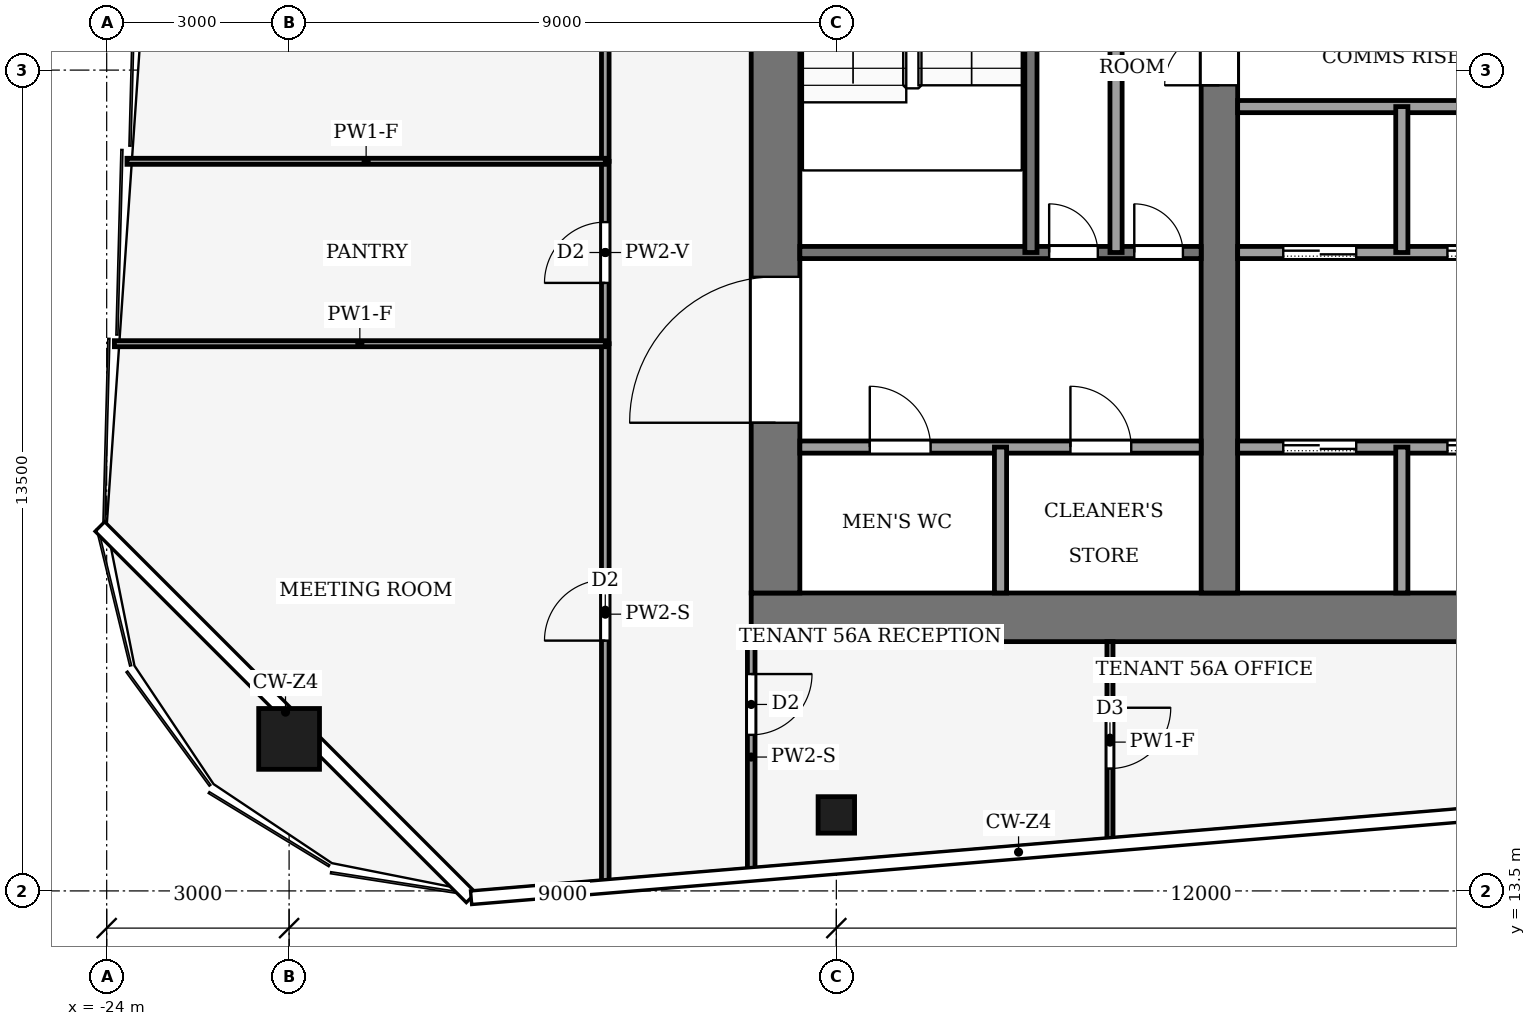
"""IFC4 building model, lengths in metres.
Left out: names, types, materials, properties, quantities, classifications, styles, units other than length and angle.
Written with IfcOpenShell. Run it as: python <this file> out.ifc"""

import sys

from ifc_helpers import new_model, si_unit, direction, frame, frame_2d, origin, origin_2d, place, context, subcontext, project, spatial, rectangle, hollow_rectangle, extrude, element, fill, save


model = new_model("IFC4")
c1 = context("Model", 3, precision=1e-05, world=origin(), true_north=direction((0.0, 1.0)))
c2 = subcontext(c1, "Body", "Model", "MODEL_VIEW")
j1 = project(units=[si_unit("LENGTHUNIT", "METRE"), si_unit("PLANEANGLEUNIT", "RADIAN")], contexts=[c1])
p1 = place(None, origin())
s1 = spatial("IfcSite", under=j1, at=p1, CompositionType="ELEMENT")
p2 = place(p1, origin())
s2 = spatial("IfcBuilding", under=s1, at=p2, CompositionType="ELEMENT")
p3 = place(p2, frame((0.0, 0.0, 246.0)))
s3 = spatial("IfcBuildingStorey", under=s2, at=p3, CompositionType="ELEMENT", Elevation=246.0)
p4 = place(p3, frame((-13.4, 18.0, -0.13), z_axis=(0.0, 0.0, 1.0), x_axis=(1.0, 0.0, 0.0)))
e1 = element("IfcWall", 1, at=p4, inside=s3, PredefinedType="SHEAR", context=c2, shape_type="SweptSolid", body=[
    extrude(rectangle(XDim=26.8, YDim=0.8, at=frame_2d((13.4, 0.0))), origin(), (0.0, 0.0, 1.0), 4.0),
])
p5 = place(p3, frame((-13.0, 18.4, -0.13), z_axis=(0.0, 0.0, 1.0), x_axis=(0.0, 1.0, 0.0)))
e2 = element("IfcWall", 2, at=p5, inside=s3, PredefinedType="SHEAR", context=c2, shape_type="SweptSolid", body=[
    extrude(rectangle(XDim=19.2, YDim=0.8, at=frame_2d((9.6, 0.0))), origin(), (0.0, 0.0, 1.0), 4.0),
])
p6 = place(p5, frame((2.8, 0.0, 0.13)))
e3 = element("IfcOpeningElement", 3, at=p6, cuts=e2, PredefinedType="OPENING", context=c2, shape_type="SweptSolid", body=[
    extrude(rectangle(XDim=2.4, YDim=2.4, at=frame_2d((1.2, 1.2))), frame((0.0, 0.41, 0.0), z_axis=(0.0, -1.0, 0.0), x_axis=(1.0, 0.0, 0.0)), (0.0, 0.0, 1.0), 0.82),
])
p7 = place(p5, frame((13.4, 0.0, 0.13)))
e4 = element("IfcOpeningElement", 4, at=p7, cuts=e2, PredefinedType="OPENING", context=c2, shape_type="SweptSolid", body=[
    extrude(rectangle(XDim=1.4, YDim=2.2, at=frame_2d((0.7, 1.1))), frame((0.0, 0.41, 0.0), z_axis=(0.0, -1.0, 0.0), x_axis=(1.0, 0.0, 0.0)), (0.0, 0.0, 1.0), 0.82),
])
p8 = place(p3, frame((-5.7, 18.4, -0.13), z_axis=(0.0, 0.0, 1.0), x_axis=(0.0, 1.0, 0.0)))
e5 = element("IfcWall", 5, at=p8, inside=s3, PredefinedType="SHEAR", context=c2, shape_type="SweptSolid", body=[
    extrude(rectangle(XDim=19.2, YDim=0.6, at=frame_2d((9.6, 0.0))), origin(), (0.0, 0.0, 1.0), 4.0),
])
p9 = place(p8, frame((8.35, 0.0, 0.13)))
e6 = element("IfcOpeningElement", 6, at=p9, cuts=e5, PredefinedType="OPENING", context=c2, shape_type="SweptSolid", body=[
    extrude(rectangle(XDim=0.9, YDim=2.1, at=frame_2d((0.45, 1.05))), frame((0.0, 0.31, 0.0), z_axis=(0.0, -1.0, 0.0), x_axis=(1.0, 0.0, 0.0)), (0.0, 0.0, 1.0), 0.62),
])
p10 = place(p3, frame((-21.0, 16.0, 0.0), z_axis=(0.0, 0.0, 1.0), x_axis=(1.0, 0.0, 0.0)))
e7 = element("IfcColumn", 7, at=p10, inside=s3, PredefinedType="COLUMN", context=c2, shape_type="SweptSolid", body=[
    extrude(hollow_rectangle(XDim=1.0, YDim=1.0, WallThickness=0.045, at=origin_2d()), origin(), (0.0, 0.0, 1.0), 4.0),
])
p11 = place(p3, frame((-12.0, 14.75, 0.0), z_axis=(0.0, 0.0, 1.0), x_axis=(1.0, 0.0, 0.0)))
e8 = element("IfcColumn", 8, at=p11, inside=s3, PredefinedType="COLUMN", context=c2, shape_type="SweptSolid", body=[
    extrude(hollow_rectangle(XDim=0.6, YDim=0.6, WallThickness=0.025, at=origin_2d()), origin(), (0.0, 0.0, 1.0), 4.0),
])
p12 = place(p3, frame((-12.6, 20.8, 0.0), z_axis=(0.0, 0.0, 1.0), x_axis=(1.0, 0.0, 0.0)))
e9 = element("IfcWall", 9, at=p12, inside=s3, PredefinedType="PARTITIONING", context=c2, shape_type="SweptSolid", body=[
    extrude(rectangle(XDim=6.6, YDim=0.2, at=frame_2d((3.3, 0.0))), origin(), (0.0, 0.0, 1.0), 3.87),
])
p13 = place(p12, frame((1.15, 0.0, 0.0)))
e10 = element("IfcOpeningElement", 10, at=p13, cuts=e9, PredefinedType="OPENING", context=c2, shape_type="SweptSolid", body=[
    extrude(rectangle(XDim=1.0, YDim=2.1, at=frame_2d((0.5, 1.05))), frame((0.0, 0.11, 0.0), z_axis=(0.0, -1.0, 0.0), x_axis=(1.0, 0.0, 0.0)), (0.0, 0.0, 1.0), 0.22),
])
p14 = place(p12, frame((4.45, 0.0, 0.0)))
e11 = element("IfcOpeningElement", 11, at=p14, cuts=e9, PredefinedType="OPENING", context=c2, shape_type="SweptSolid", body=[
    extrude(rectangle(XDim=1.0, YDim=2.1, at=frame_2d((0.5, 1.05))), frame((0.0, 0.11, 0.0), z_axis=(0.0, -1.0, 0.0), x_axis=(1.0, 0.0, 0.0)), (0.0, 0.0, 1.0), 0.22),
])
p15 = place(p3, frame((-5.4, 20.8, 0.0), z_axis=(0.0, 0.0, 1.0), x_axis=(1.0, 0.0, 0.0)))
e12 = element("IfcWall", 12, at=p15, inside=s3, PredefinedType="PARTITIONING", context=c2, shape_type="SweptSolid", body=[
    extrude(rectangle(XDim=10.8, YDim=0.2, at=frame_2d((5.4, 0.0))), origin(), (0.0, 0.0, 1.0), 3.87),
])
p16 = place(p15, frame((0.75, 0.0, 0.0)))
e13 = element("IfcOpeningElement", 13, at=p16, cuts=e12, PredefinedType="OPENING", context=c2, shape_type="SweptSolid", body=[
    extrude(rectangle(XDim=1.2, YDim=2.2, at=frame_2d((0.6, 1.1))), frame((0.0, 0.11, 0.0), z_axis=(0.0, -1.0, 0.0), x_axis=(1.0, 0.0, 0.0)), (0.0, 0.0, 1.0), 0.22),
])
p17 = place(p15, frame((3.45, 0.0, 0.0)))
e14 = element("IfcOpeningElement", 14, at=p17, cuts=e12, PredefinedType="OPENING", context=c2, shape_type="SweptSolid", body=[
    extrude(rectangle(XDim=1.2, YDim=2.2, at=frame_2d((0.6, 1.1))), frame((0.0, 0.11, 0.0), z_axis=(0.0, -1.0, 0.0), x_axis=(1.0, 0.0, 0.0)), (0.0, 0.0, 1.0), 0.22),
])
p18 = place(p15, frame((6.15, 0.0, 0.0)))
e15 = element("IfcOpeningElement", 15, at=p18, cuts=e12, PredefinedType="OPENING", context=c2, shape_type="SweptSolid", body=[
    extrude(rectangle(XDim=1.2, YDim=2.2, at=frame_2d((0.6, 1.1))), frame((0.0, 0.11, 0.0), z_axis=(0.0, -1.0, 0.0), x_axis=(1.0, 0.0, 0.0)), (0.0, 0.0, 1.0), 0.22),
])
p19 = place(p15, frame((8.85, 0.0, 0.0)))
e16 = element("IfcOpeningElement", 16, at=p19, cuts=e12, PredefinedType="OPENING", context=c2, shape_type="SweptSolid", body=[
    extrude(rectangle(XDim=1.2, YDim=2.2, at=frame_2d((0.6, 1.1))), frame((0.0, 0.11, 0.0), z_axis=(0.0, -1.0, 0.0), x_axis=(1.0, 0.0, 0.0)), (0.0, 0.0, 1.0), 0.22),
])
p20 = place(p3, frame((-12.6, 24.0, 0.0), z_axis=(0.0, 0.0, 1.0), x_axis=(1.0, 0.0, 0.0)))
e17 = element("IfcWall", 17, at=p20, inside=s3, PredefinedType="PARTITIONING", context=c2, shape_type="SweptSolid", body=[
    extrude(rectangle(XDim=6.6, YDim=0.2, at=frame_2d((3.3, 0.0))), origin(), (0.0, 0.0, 1.0), 3.87),
])
p21 = place(p20, frame((4.1, 0.0, 0.0)))
e18 = element("IfcOpeningElement", 18, at=p21, cuts=e17, PredefinedType="OPENING", context=c2, shape_type="SweptSolid", body=[
    extrude(rectangle(XDim=0.8, YDim=2.1, at=frame_2d((0.4, 1.05))), frame((0.0, 0.11, 0.0), z_axis=(0.0, -1.0, 0.0), x_axis=(1.0, 0.0, 0.0)), (0.0, 0.0, 1.0), 0.22),
])
p22 = place(p20, frame((5.5, 0.0, 0.0)))
e19 = element("IfcOpeningElement", 19, at=p22, cuts=e17, PredefinedType="OPENING", context=c2, shape_type="SweptSolid", body=[
    extrude(rectangle(XDim=0.8, YDim=2.1, at=frame_2d((0.4, 1.05))), frame((0.0, 0.11, 0.0), z_axis=(0.0, -1.0, 0.0), x_axis=(1.0, 0.0, 0.0)), (0.0, 0.0, 1.0), 0.22),
])
p23 = place(p3, frame((-5.4, 24.0, 0.0), z_axis=(0.0, 0.0, 1.0), x_axis=(1.0, 0.0, 0.0)))
e20 = element("IfcWall", 20, at=p23, inside=s3, PredefinedType="PARTITIONING", context=c2, shape_type="SweptSolid", body=[
    extrude(rectangle(XDim=10.8, YDim=0.2, at=frame_2d((5.4, 0.0))), origin(), (0.0, 0.0, 1.0), 3.87),
])
p24 = place(p23, frame((0.75, 0.0, 0.0)))
e21 = element("IfcOpeningElement", 21, at=p24, cuts=e20, PredefinedType="OPENING", context=c2, shape_type="SweptSolid", body=[
    extrude(rectangle(XDim=1.2, YDim=2.2, at=frame_2d((0.6, 1.1))), frame((0.0, 0.11, 0.0), z_axis=(0.0, -1.0, 0.0), x_axis=(1.0, 0.0, 0.0)), (0.0, 0.0, 1.0), 0.22),
])
p25 = place(p23, frame((3.45, 0.0, 0.0)))
e22 = element("IfcOpeningElement", 22, at=p25, cuts=e20, PredefinedType="OPENING", context=c2, shape_type="SweptSolid", body=[
    extrude(rectangle(XDim=1.2, YDim=2.2, at=frame_2d((0.6, 1.1))), frame((0.0, 0.11, 0.0), z_axis=(0.0, -1.0, 0.0), x_axis=(1.0, 0.0, 0.0)), (0.0, 0.0, 1.0), 0.22),
])
p26 = place(p23, frame((6.15, 0.0, 0.0)))
e23 = element("IfcOpeningElement", 23, at=p26, cuts=e20, PredefinedType="OPENING", context=c2, shape_type="SweptSolid", body=[
    extrude(rectangle(XDim=1.2, YDim=2.2, at=frame_2d((0.6, 1.1))), frame((0.0, 0.11, 0.0), z_axis=(0.0, -1.0, 0.0), x_axis=(1.0, 0.0, 0.0)), (0.0, 0.0, 1.0), 0.22),
])
p27 = place(p23, frame((8.85, 0.0, 0.0)))
e24 = element("IfcOpeningElement", 24, at=p27, cuts=e20, PredefinedType="OPENING", context=c2, shape_type="SweptSolid", body=[
    extrude(rectangle(XDim=1.2, YDim=2.2, at=frame_2d((0.6, 1.1))), frame((0.0, 0.11, 0.0), z_axis=(0.0, -1.0, 0.0), x_axis=(1.0, 0.0, 0.0)), (0.0, 0.0, 1.0), 0.22),
])
p28 = place(p3, frame((-5.4, 26.4, 0.0), z_axis=(0.0, 0.0, 1.0), x_axis=(1.0, 0.0, 0.0)))
e25 = element("IfcWall", 25, at=p28, inside=s3, PredefinedType="PARTITIONING", context=c2, shape_type="SweptSolid", body=[
    extrude(rectangle(XDim=10.8, YDim=0.2, at=frame_2d((5.4, 0.0))), origin(), (0.0, 0.0, 1.0), 3.87),
])
p29 = place(p3, frame((-9.3, 18.4, 0.0), z_axis=(0.0, 0.0, 1.0), x_axis=(0.0, 1.0, 0.0)))
e26 = element("IfcWall", 26, at=p29, inside=s3, PredefinedType="PARTITIONING", context=c2, shape_type="SweptSolid", body=[
    extrude(rectangle(XDim=2.4, YDim=0.2, at=frame_2d((1.2, 0.0))), origin(), (0.0, 0.0, 1.0), 3.87),
])
for number, where, z_axis, x_axis in (
    (27, (-8.8, 24.0, 0.0), (0.0, 0.0, 1.0), (0.0, 1.0, 0.0)),
    (28, (-7.4, 24.0, 0.0), (0.0, 0.0, 1.0), (0.0, 1.0, 0.0)),
):
    element("IfcWall", number, at=place(p3, frame(where, z_axis=z_axis, x_axis=x_axis)), inside=s3, PredefinedType="PARTITIONING", context=c2, shape_type="SweptSolid", body=[
        extrude(rectangle(XDim=7.4, YDim=0.2, at=frame_2d((3.7, 0.0))), origin(), (0.0, 0.0, 1.0), 3.87),
    ])
p30 = place(p3, frame((-2.7, 18.4, 0.0), z_axis=(0.0, 0.0, 1.0), x_axis=(0.0, 1.0, 0.0)))
e29 = element("IfcWall", 29, at=p30, inside=s3, PredefinedType="PARTITIONING", context=c2, shape_type="SweptSolid", body=[
    extrude(rectangle(XDim=2.4, YDim=0.2, at=frame_2d((1.2, 0.0))), origin(), (0.0, 0.0, 1.0), 3.87),
])
p31 = place(p3, frame((-2.7, 24.0, 0.0), z_axis=(0.0, 0.0, 1.0), x_axis=(0.0, 1.0, 0.0)))
e30 = element("IfcWall", 30, at=p31, inside=s3, PredefinedType="PARTITIONING", context=c2, shape_type="SweptSolid", body=[
    extrude(rectangle(XDim=2.4, YDim=0.2, at=frame_2d((1.2, 0.0))), origin(), (0.0, 0.0, 1.0), 3.87),
])
p32 = place(p3, frame((-15.8, 13.603, 0.0), z_axis=(0.0, 0.0, 1.0), x_axis=(0.0, 1.0, 0.0)))
e31 = element("IfcWall", 31, at=p32, inside=s3, PredefinedType="PARTITIONING", context=c2, shape_type="SweptSolid", body=[
    extrude(rectangle(XDim=8.897, YDim=0.125, at=frame_2d((4.448, 0.0))), origin(), (0.0, 0.0, 1.0), 3.04),
])
p33 = place(p32, frame((4.013, 0.0, 0.0)))
e32 = element("IfcOpeningElement", 32, at=p33, cuts=e31, PredefinedType="OPENING", context=c2, shape_type="SweptSolid", body=[
    extrude(rectangle(XDim=1.0, YDim=2.1, at=frame_2d((0.5, 1.05))), frame((0.0, 0.073, 0.0), z_axis=(0.0, -1.0, 0.0), x_axis=(1.0, 0.0, 0.0)), (0.0, 0.0, 1.0), 0.145),
])
p34 = place(p3, frame((-15.8, 22.5, 0.0), z_axis=(0.0, 0.0, 1.0), x_axis=(0.0, 1.0, 0.0)))
e33 = element("IfcWall", 33, at=p34, inside=s3, PredefinedType="PARTITIONING", context=c2, shape_type="SweptSolid", body=[
    extrude(rectangle(XDim=3.0, YDim=0.125, at=frame_2d((1.5, 0.0))), origin(), (0.0, 0.0, 1.0), 3.44),
])
p35 = place(p34, frame((1.0, 0.0, 0.0)))
e34 = element("IfcOpeningElement", 34, at=p35, cuts=e33, PredefinedType="OPENING", context=c2, shape_type="SweptSolid", body=[
    extrude(rectangle(XDim=1.0, YDim=2.1, at=frame_2d((0.5, 1.05))), frame((0.0, 0.073, 0.0), z_axis=(0.0, -1.0, 0.0), x_axis=(1.0, 0.0, 0.0)), (0.0, 0.0, 1.0), 0.145),
])
p36 = place(p3, frame((-15.8, 25.5, 0.0), z_axis=(0.0, 0.0, 1.0), x_axis=(0.0, 1.0, 0.0)))
e35 = element("IfcWall", 35, at=p36, inside=s3, PredefinedType="PARTITIONING", context=c2, shape_type="SweptSolid", body=[
    extrude(rectangle(XDim=9.0, YDim=0.125, at=frame_2d((4.5, 0.0))), origin(), (0.0, 0.0, 1.0), 3.48),
])
p37 = place(p36, frame((4.0, 0.0, 0.0)))
e36 = element("IfcOpeningElement", 36, at=p37, cuts=e35, PredefinedType="OPENING", context=c2, shape_type="SweptSolid", body=[
    extrude(rectangle(XDim=1.0, YDim=2.1, at=frame_2d((0.5, 1.05))), frame((0.0, 0.073, 0.0), z_axis=(0.0, -1.0, 0.0), x_axis=(1.0, 0.0, 0.0)), (0.0, 0.0, 1.0), 0.145),
])
p38 = place(p3, frame((-13.4, 17.6, 0.0), z_axis=(0.0, 0.0, 1.0), x_axis=(0.0, -1.0, 0.0)))
e37 = element("IfcWall", 37, at=p38, inside=s3, PredefinedType="PARTITIONING", context=c2, shape_type="SweptSolid", body=[
    extrude(rectangle(XDim=3.797, YDim=0.125, at=frame_2d((1.898, 0.0))), origin(), (0.0, 0.0, 1.0), 3.04),
])
p39 = place(p38, frame((0.533, 0.0, 0.0)))
e38 = element("IfcOpeningElement", 38, at=p39, cuts=e37, PredefinedType="OPENING", context=c2, shape_type="SweptSolid", body=[
    extrude(rectangle(XDim=1.0, YDim=2.1, at=frame_2d((0.5, 1.05))), frame((0.0, 0.073, 0.0), z_axis=(0.0, -1.0, 0.0), x_axis=(1.0, 0.0, 0.0)), (0.0, 0.0, 1.0), 0.145),
])
p40 = place(p3, frame((-15.8, 22.5, 0.0), z_axis=(0.0, 0.0, 1.0), x_axis=(-1.0, 0.0, 0.0)))
e39 = element("IfcWall", 39, at=p40, inside=s3, PredefinedType="PARTITIONING", context=c2, shape_type="SweptSolid", body=[
    extrude(rectangle(XDim=8.073, YDim=0.1, at=frame_2d((4.037, 0.0))), origin(), (0.0, 0.0, 1.0), 3.04),
])
p41 = place(p3, frame((-15.8, 25.5, 0.0), z_axis=(0.0, 0.0, 1.0), x_axis=(-1.0, 0.0, 0.0)))
e40 = element("IfcWall", 40, at=p41, inside=s3, PredefinedType="PARTITIONING", context=c2, shape_type="SweptSolid", body=[
    extrude(rectangle(XDim=7.866, YDim=0.1, at=frame_2d((3.933, 0.0))), origin(), (0.0, 0.0, 1.0), 3.04),
])
p42 = place(p3, frame((-7.5, 17.6, 0.0), z_axis=(0.0, 0.0, 1.0), x_axis=(0.0, -1.0, 0.0)))
e41 = element("IfcWall", 41, at=p42, inside=s3, PredefinedType="PARTITIONING", context=c2, shape_type="SweptSolid", body=[
    extrude(rectangle(XDim=3.305, YDim=0.1, at=frame_2d((1.653, 0.0))), origin(), (0.0, 0.0, 1.0), 3.04),
])
p43 = place(p42, frame((1.087, 0.0, 0.0)))
e42 = element("IfcOpeningElement", 42, at=p43, cuts=e41, PredefinedType="OPENING", context=c2, shape_type="SweptSolid", body=[
    extrude(rectangle(XDim=1.0, YDim=2.1, at=frame_2d((0.5, 1.05))), frame((0.0, 0.06, 0.0), z_axis=(0.0, -1.0, 0.0), x_axis=(1.0, 0.0, 0.0)), (0.0, 0.0, 1.0), 0.12),
])
p44 = place(p16, origin())
e43 = element("IfcDoor", 43, at=p44, inside=s3, OperationType="SLIDING_TO_LEFT", PredefinedType="DOOR", context=c2, shape_type="SweptSolid", body=[
    extrude(rectangle(XDim=1.2, YDim=2.2, at=frame_2d((0.6, 1.1))), frame((0.0, 0.025, 0.0), z_axis=(0.0, -1.0, 0.0), x_axis=(1.0, 0.0, 0.0)), (0.0, 0.0, 1.0), 0.05),
])
fill(e13, e43)
p45 = place(p17, origin())
e44 = element("IfcDoor", 44, at=p45, inside=s3, OperationType="SLIDING_TO_LEFT", PredefinedType="DOOR", context=c2, shape_type="SweptSolid", body=[
    extrude(rectangle(XDim=1.2, YDim=2.2, at=frame_2d((0.6, 1.1))), frame((0.0, 0.025, 0.0), z_axis=(0.0, -1.0, 0.0), x_axis=(1.0, 0.0, 0.0)), (0.0, 0.0, 1.0), 0.05),
])
fill(e14, e44)
p46 = place(p24, origin())
e45 = element("IfcDoor", 45, at=p46, inside=s3, OperationType="SLIDING_TO_LEFT", PredefinedType="DOOR", context=c2, shape_type="SweptSolid", body=[
    extrude(rectangle(XDim=1.2, YDim=2.2, at=frame_2d((0.6, 1.1))), frame((0.0, 0.025, 0.0), z_axis=(0.0, -1.0, 0.0), x_axis=(1.0, 0.0, 0.0)), (0.0, 0.0, 1.0), 0.05),
])
fill(e21, e45)
p47 = place(p25, origin())
e46 = element("IfcDoor", 46, at=p47, inside=s3, OperationType="SLIDING_TO_LEFT", PredefinedType="DOOR", context=c2, shape_type="SweptSolid", body=[
    extrude(rectangle(XDim=1.2, YDim=2.2, at=frame_2d((0.6, 1.1))), frame((0.0, 0.025, 0.0), z_axis=(0.0, -1.0, 0.0), x_axis=(1.0, 0.0, 0.0)), (0.0, 0.0, 1.0), 0.05),
])
fill(e22, e46)
p48 = place(p13, origin())
e47 = element("IfcDoor", 47, at=p48, inside=s3, OperationType="SINGLE_SWING_LEFT", PredefinedType="DOOR", context=c2, shape_type="SweptSolid", body=[
    extrude(rectangle(XDim=1.0, YDim=2.1, at=frame_2d((0.5, 1.05))), frame((0.0, 0.025, 0.0), z_axis=(0.0, -1.0, 0.0), x_axis=(1.0, 0.0, 0.0)), (0.0, 0.0, 1.0), 0.05),
])
fill(e10, e47)
p49 = place(p14, origin())
e48 = element("IfcDoor", 48, at=p49, inside=s3, OperationType="SINGLE_SWING_LEFT", PredefinedType="DOOR", context=c2, shape_type="SweptSolid", body=[
    extrude(rectangle(XDim=1.0, YDim=2.1, at=frame_2d((0.5, 1.05))), frame((0.0, 0.025, 0.0), z_axis=(0.0, -1.0, 0.0), x_axis=(1.0, 0.0, 0.0)), (0.0, 0.0, 1.0), 0.05),
])
fill(e11, e48)
p50 = place(p21, origin())
e49 = element("IfcDoor", 49, at=p50, inside=s3, OperationType="SINGLE_SWING_LEFT", PredefinedType="DOOR", context=c2, shape_type="SweptSolid", body=[
    extrude(rectangle(XDim=0.8, YDim=2.1, at=frame_2d((0.4, 1.05))), frame((0.0, 0.025, 0.0), z_axis=(0.0, -1.0, 0.0), x_axis=(1.0, 0.0, 0.0)), (0.0, 0.0, 1.0), 0.05),
])
fill(e18, e49)
p51 = place(p22, origin())
e50 = element("IfcDoor", 50, at=p51, inside=s3, OperationType="SINGLE_SWING_RIGHT", PredefinedType="DOOR", context=c2, shape_type="SweptSolid", body=[
    extrude(rectangle(XDim=0.8, YDim=2.1, at=frame_2d((0.4, 1.05))), frame((0.0, 0.025, 0.0), z_axis=(0.0, -1.0, 0.0), x_axis=(1.0, 0.0, 0.0)), (0.0, 0.0, 1.0), 0.05),
])
fill(e19, e50)
p52 = place(p9, origin())
e51 = element("IfcDoor", 51, at=p52, inside=s3, OperationType="SINGLE_SWING_LEFT", PredefinedType="DOOR", context=c2, shape_type="SweptSolid", body=[
    extrude(rectangle(XDim=0.9, YDim=2.1, at=frame_2d((0.45, 1.05))), frame((0.0, 0.025, 0.0), z_axis=(0.0, -1.0, 0.0), x_axis=(1.0, 0.0, 0.0)), (0.0, 0.0, 1.0), 0.05),
])
fill(e6, e51)
p53 = place(p6, origin())
e52 = element("IfcDoor", 52, at=p53, inside=s3, OperationType="DOUBLE_DOOR_SINGLE_SWING", PredefinedType="DOOR", context=c2, shape_type="SweptSolid", body=[
    extrude(rectangle(XDim=2.4, YDim=2.4, at=frame_2d((1.2, 1.2))), frame((0.0, 0.025, 0.0), z_axis=(0.0, -1.0, 0.0), x_axis=(1.0, 0.0, 0.0)), (0.0, 0.0, 1.0), 0.05),
])
fill(e3, e52)
p54 = place(p33, origin())
e53 = element("IfcDoor", 53, at=p54, inside=s3, OperationType="SINGLE_SWING_RIGHT", PredefinedType="DOOR", context=c2, shape_type="SweptSolid", body=[
    extrude(rectangle(XDim=1.0, YDim=2.1, at=frame_2d((0.5, 1.05))), frame((0.0, 0.025, 0.0), z_axis=(0.0, -1.0, 0.0), x_axis=(1.0, 0.0, 0.0)), (0.0, 0.0, 1.0), 0.05),
])
fill(e32, e53)
p55 = place(p35, origin())
e54 = element("IfcDoor", 54, at=p55, inside=s3, OperationType="SINGLE_SWING_RIGHT", PredefinedType="DOOR", context=c2, shape_type="SweptSolid", body=[
    extrude(rectangle(XDim=1.0, YDim=2.1, at=frame_2d((0.5, 1.05))), frame((0.0, 0.025, 0.0), z_axis=(0.0, -1.0, 0.0), x_axis=(1.0, 0.0, 0.0)), (0.0, 0.0, 1.0), 0.05),
])
fill(e34, e54)
p56 = place(p39, origin())
e55 = element("IfcDoor", 55, at=p56, inside=s3, OperationType="SINGLE_SWING_LEFT", PredefinedType="DOOR", context=c2, shape_type="SweptSolid", body=[
    extrude(rectangle(XDim=1.0, YDim=2.1, at=frame_2d((0.5, 1.05))), frame((0.0, 0.025, 0.0), z_axis=(0.0, -1.0, 0.0), x_axis=(1.0, 0.0, 0.0)), (0.0, 0.0, 1.0), 0.05),
])
fill(e38, e55)
p57 = place(p43, origin())
e56 = element("IfcDoor", 56, at=p57, inside=s3, OperationType="SINGLE_SWING_LEFT", PredefinedType="DOOR", context=c2, shape_type="SweptSolid", body=[
    extrude(rectangle(XDim=1.0, YDim=2.1, at=frame_2d((0.5, 1.05))), frame((0.0, 0.025, 0.0), z_axis=(0.0, -1.0, 0.0), x_axis=(1.0, 0.0, 0.0)), (0.0, 0.0, 1.0), 0.05),
])
fill(e42, e56)
save(model, sys.argv[1])
